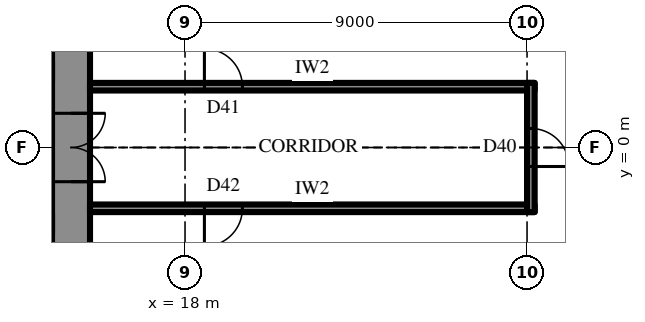
"""IFC4 building model, lengths in metres.
Left out: names, types, materials, properties, quantities, classifications, styles, units other than length and angle.
Written with IfcOpenShell. Run it as: python <this file> out.ifc"""

import sys

from ifc_helpers import new_model, si_unit, direction, frame, frame_2d, origin, place, context, subcontext, project, spatial, rectangle, extrude, element, fill, save


model = new_model("IFC4")
c1 = context("Model", 3, precision=1e-05, world=origin(), true_north=direction((0.0, 1.0)))
c2 = subcontext(c1, "Body", "Model", "MODEL_VIEW")
j1 = project(units=[si_unit("LENGTHUNIT", "METRE"), si_unit("PLANEANGLEUNIT", "RADIAN")], contexts=[c1])
p1 = place(None, origin())
s1 = spatial("IfcSite", under=j1, at=p1, CompositionType="ELEMENT")
p2 = place(p1, origin())
s2 = spatial("IfcBuilding", under=s1, at=p2, CompositionType="ELEMENT")
p3 = place(p2, frame((0.0, 0.0, 240.7)))
s3 = spatial("IfcBuildingStorey", under=s2, at=p3, CompositionType="ELEMENT", Elevation=240.7)
p4 = place(p3, frame((15.0, -10.7, 0.0), z_axis=(0.0, 0.0, 1.0), x_axis=(0.0, 1.0, 0.0)))
e1 = element("IfcWall", 1, at=p4, inside=s3, PredefinedType="SHEAR", context=c2, shape_type="SweptSolid", body=[
    extrude(rectangle(XDim=21.4, YDim=1.0, at=frame_2d((10.7, 0.0))), origin(), (0.0, 0.0, 1.0), 4.2),
])
p5 = place(p4, frame((9.8, 0.0, 0.0)))
e2 = element("IfcOpeningElement", 2, at=p5, cuts=e1, PredefinedType="OPENING", context=c2, shape_type="SweptSolid", body=[
    extrude(rectangle(XDim=1.8, YDim=2.4, at=frame_2d((0.9, 1.2))), frame((0.0, 0.51, 0.0), z_axis=(0.0, -1.0, 0.0), x_axis=(1.0, 0.0, 0.0)), (0.0, 0.0, 1.0), 1.02),
])
p6 = place(p3, frame((12.3, 2.0, 0.0), z_axis=(0.0, 0.0, 1.0), x_axis=(1.0, 0.0, 0.0)))
e3 = element("IfcWall", 3, at=p6, inside=s3, PredefinedType="SHEAR", context=c2, shape_type="SweptSolid", body=[
    extrude(rectangle(XDim=2.2, YDim=0.5, at=frame_2d((1.1, 0.0))), origin(), (0.0, 0.0, 1.0), 4.2),
])
p7 = place(p6, frame((0.8, 0.0, 0.0)))
e4 = element("IfcOpeningElement", 4, at=p7, cuts=e3, PredefinedType="OPENING", context=c2, shape_type="SweptSolid", body=[
    extrude(rectangle(XDim=0.9, YDim=2.2, at=frame_2d((0.45, 1.1))), frame((0.0, 0.26, 0.0), z_axis=(0.0, -1.0, 0.0), x_axis=(1.0, 0.0, 0.0)), (0.0, 0.0, 1.0), 0.52),
])
p8 = place(p3, frame((15.5, 1.6, 0.0), z_axis=(0.0, 0.0, 1.0), x_axis=(1.0, 0.0, 0.0)))
e5 = element("IfcWall", 5, at=p8, inside=s3, PredefinedType="PARTITIONING", context=c2, shape_type="SweptSolid", body=[
    extrude(rectangle(XDim=11.7, YDim=0.2, at=frame_2d((5.85, 0.0))), origin(), (0.0, 0.0, 1.0), 4.0),
])
p9 = place(p8, frame((3.01, 0.0, 0.0)))
e6 = element("IfcOpeningElement", 6, at=p9, cuts=e5, PredefinedType="OPENING", context=c2, shape_type="SweptSolid", body=[
    extrude(rectangle(XDim=1.0, YDim=2.2, at=frame_2d((0.5, 1.1))), frame((0.0, 0.11, 0.0), z_axis=(0.0, -1.0, 0.0), x_axis=(1.0, 0.0, 0.0)), (0.0, 0.0, 1.0), 0.22),
])
p10 = place(p3, frame((15.5, -1.6, 0.0), z_axis=(0.0, 0.0, 1.0), x_axis=(1.0, 0.0, 0.0)))
e7 = element("IfcWall", 7, at=p10, inside=s3, PredefinedType="PARTITIONING", context=c2, shape_type="SweptSolid", body=[
    extrude(rectangle(XDim=11.7, YDim=0.2, at=frame_2d((5.85, 0.0))), origin(), (0.0, 0.0, 1.0), 4.0),
])
p11 = place(p10, frame((3.01, 0.0, 0.0)))
e8 = element("IfcOpeningElement", 8, at=p11, cuts=e7, PredefinedType="OPENING", context=c2, shape_type="SweptSolid", body=[
    extrude(rectangle(XDim=1.0, YDim=2.2, at=frame_2d((0.5, 1.1))), frame((0.0, 0.11, 0.0), z_axis=(0.0, -1.0, 0.0), x_axis=(1.0, 0.0, 0.0)), (0.0, 0.0, 1.0), 0.22),
])
p12 = place(p3, frame((27.1, -1.7, 0.0), z_axis=(0.0, 0.0, 1.0), x_axis=(0.0, 1.0, 0.0)))
e9 = element("IfcWall", 9, at=p12, inside=s3, PredefinedType="PARTITIONING", context=c2, shape_type="SweptSolid", body=[
    extrude(rectangle(XDim=3.4, YDim=0.2, at=frame_2d((1.7, 0.0))), origin(), (0.0, 0.0, 1.0), 4.0),
])
p13 = place(p12, frame((1.2, 0.0, 0.0)))
e10 = element("IfcOpeningElement", 10, at=p13, cuts=e9, PredefinedType="OPENING", context=c2, shape_type="SweptSolid", body=[
    extrude(rectangle(XDim=1.0, YDim=2.2, at=frame_2d((0.5, 1.1))), frame((0.0, 0.11, 0.0), z_axis=(0.0, -1.0, 0.0), x_axis=(1.0, 0.0, 0.0)), (0.0, 0.0, 1.0), 0.22),
])
p14 = place(p5, frame((1.8, 0.0, 0.0), z_axis=(0.0, 0.0, 1.0), x_axis=(-1.0, 0.0, 0.0)))
e11 = element("IfcDoor", 11, at=p14, inside=s3, OperationType="DOUBLE_DOOR_SINGLE_SWING", PredefinedType="DOOR", context=c2, shape_type="SweptSolid", body=[
    extrude(rectangle(XDim=1.8, YDim=2.4, at=frame_2d((0.9, 1.2))), frame((0.0, 0.025, 0.0), z_axis=(0.0, -1.0, 0.0), x_axis=(1.0, 0.0, 0.0)), (0.0, 0.0, 1.0), 0.05),
])
fill(e2, e11)
p15 = place(p9, origin())
e12 = element("IfcDoor", 12, at=p15, inside=s3, OperationType="SINGLE_SWING_RIGHT", PredefinedType="DOOR", context=c2, shape_type="SweptSolid", body=[
    extrude(rectangle(XDim=1.0, YDim=2.2, at=frame_2d((0.5, 1.1))), frame((0.0, 0.025, 0.0), z_axis=(0.0, -1.0, 0.0), x_axis=(1.0, 0.0, 0.0)), (0.0, 0.0, 1.0), 0.05),
])
fill(e6, e12)
p16 = place(p11, frame((1.0, 0.0, 0.0), z_axis=(0.0, 0.0, 1.0), x_axis=(-1.0, 0.0, 0.0)))
e13 = element("IfcDoor", 13, at=p16, inside=s3, OperationType="SINGLE_SWING_LEFT", PredefinedType="DOOR", context=c2, shape_type="SweptSolid", body=[
    extrude(rectangle(XDim=1.0, YDim=2.2, at=frame_2d((0.5, 1.1))), frame((0.0, 0.025, 0.0), z_axis=(0.0, -1.0, 0.0), x_axis=(1.0, 0.0, 0.0)), (0.0, 0.0, 1.0), 0.05),
])
fill(e8, e13)
p17 = place(p13, frame((1.0, 0.0, 0.0), z_axis=(0.0, 0.0, 1.0), x_axis=(-1.0, 0.0, 0.0)))
e14 = element("IfcDoor", 14, at=p17, inside=s3, OperationType="SINGLE_SWING_LEFT", PredefinedType="DOOR", context=c2, shape_type="SweptSolid", body=[
    extrude(rectangle(XDim=1.0, YDim=2.2, at=frame_2d((0.5, 1.1))), frame((0.0, 0.025, 0.0), z_axis=(0.0, -1.0, 0.0), x_axis=(1.0, 0.0, 0.0)), (0.0, 0.0, 1.0), 0.05),
])
fill(e10, e14)
save(model, sys.argv[1])
